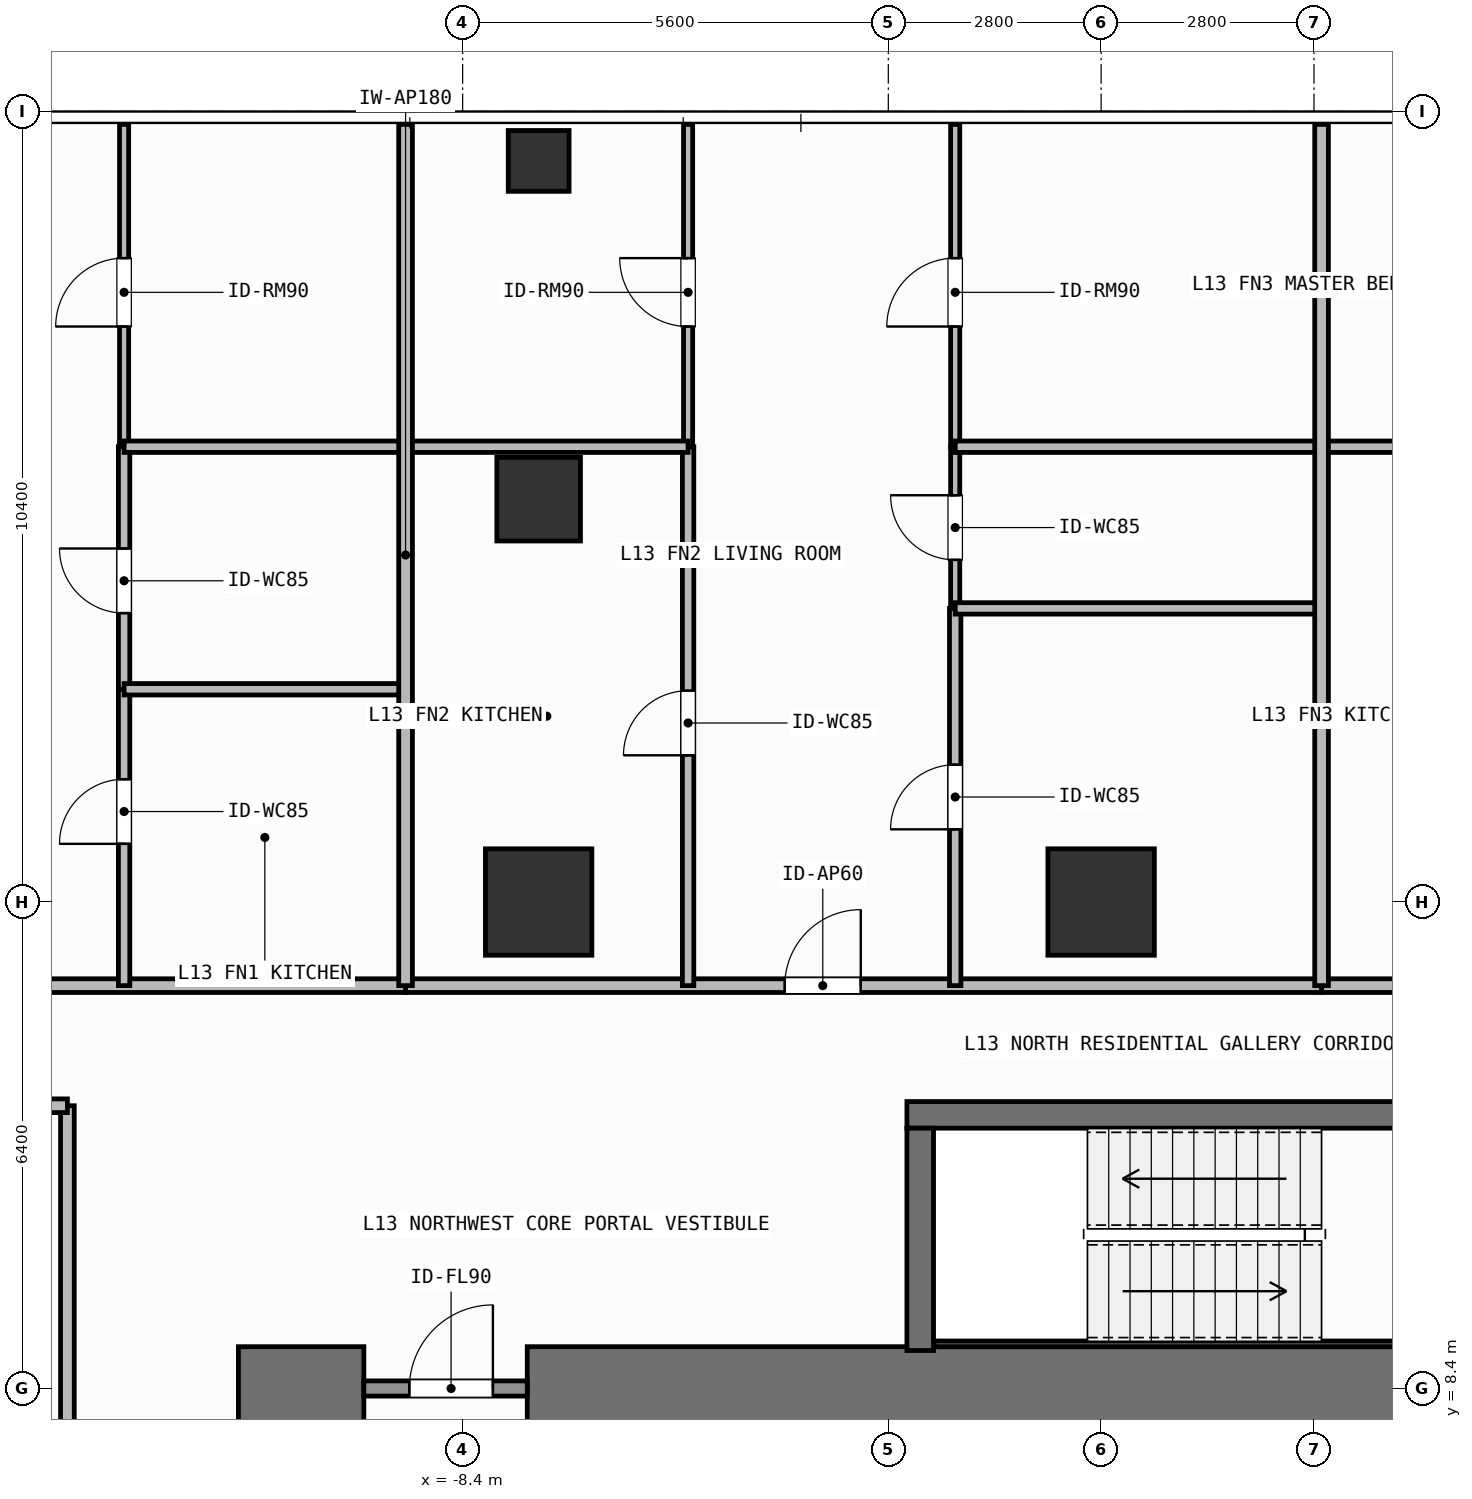
"""IFC4 building model, lengths in metres.
Left out: names, types, materials, properties, quantities, classifications, styles, units other than length and angle.
Written with IfcOpenShell. Run it as: python <this file> out.ifc"""

import sys

from ifc_helpers import new_model, si_unit, direction, frame, frame_2d, origin, origin_2d, place, context, subcontext, project, spatial, rectangle, hollow_rectangle, extrude, element, fill, save


model = new_model("IFC4")
c1 = context("Model", 3, precision=1e-05, world=origin(), true_north=direction((0.0, 1.0)))
c2 = subcontext(c1, "Body", "Model", "MODEL_VIEW")
j1 = project(units=[si_unit("LENGTHUNIT", "METRE"), si_unit("PLANEANGLEUNIT", "RADIAN")], contexts=[c1])
p1 = place(None, origin())
s1 = spatial("IfcSite", under=j1, at=p1, CompositionType="ELEMENT")
p2 = place(p1, origin())
s2 = spatial("IfcBuilding", under=s1, at=p2, CompositionType="ELEMENT")
p3 = place(p2, frame((0.0, 0.0, 50.1)))
s3 = spatial("IfcBuildingStorey", under=s2, at=p3, CompositionType="ELEMENT", Elevation=50.1)
p4 = place(p3, frame((-11.35, 8.4, 0.0), z_axis=(0.0, 0.0, 1.0), x_axis=(1.0, 0.0, 0.0)))
e1 = element("IfcWall", 1, at=p4, inside=s3, PredefinedType="SHEAR", context=c2, shape_type="SweptSolid", body=[
    extrude(rectangle(XDim=1.65, YDim=1.1, at=frame_2d((0.825, 0.0))), origin(), (0.0, 0.0, 1.0), 3.9),
])
p5 = place(p3, frame((-7.55, 8.4, 0.0), z_axis=(0.0, 0.0, 1.0), x_axis=(1.0, 0.0, 0.0)))
e2 = element("IfcWall", 2, at=p5, inside=s3, PredefinedType="SHEAR", context=c2, shape_type="SweptSolid", body=[
    extrude(rectangle(XDim=16.5, YDim=1.1, at=frame_2d((8.25, 0.0))), origin(), (0.0, 0.0, 1.0), 3.9),
])
p6 = place(p3, frame((-2.555, 12.0, 0.0), z_axis=(0.0, 0.0, 1.0), x_axis=(1.0, 0.0, 0.0)))
e3 = element("IfcWall", 3, at=p6, inside=s3, PredefinedType="SHEAR", context=c2, shape_type="SweptSolid", body=[
    extrude(rectangle(XDim=7.31, YDim=0.35, at=frame_2d((3.655, 0.0))), origin(), (0.0, 0.0, 1.0), 3.9),
])
p7 = place(p3, frame((-2.2, 8.988, 0.0), z_axis=(0.0, 0.0, 1.0), x_axis=(1.0, 0.0, 0.0)))
e4 = element("IfcWall", 4, at=p7, inside=s3, PredefinedType="SHEAR", context=c2, shape_type="SweptSolid", body=[
    extrude(rectangle(XDim=6.6, YDim=0.075, at=frame_2d((3.3, 0.0))), origin(), (0.0, 0.0, 1.0), 3.9),
])
p8 = place(p3, frame((-2.38, 8.9, 0.0), z_axis=(0.0, 0.0, 1.0), x_axis=(0.0, 1.0, 0.0)))
e5 = element("IfcWall", 5, at=p8, inside=s3, PredefinedType="SHEAR", context=c2, shape_type="SweptSolid", body=[
    extrude(rectangle(XDim=2.925, YDim=0.35, at=frame_2d((1.462, 0.0))), origin(), (0.0, 0.0, 1.0), 3.9),
])
for number, where, z_axis, x_axis in (
    (6, (-7.4, 14.8, 0.0), (0.0, 0.0, 1.0), (1.0, 0.0, 0.0)),
    (7, (0.0, 14.8, 0.0), (0.0, 0.0, 1.0), (1.0, 0.0, 0.0)),
):
    element("IfcColumn", number, at=place(p3, frame(where, z_axis=z_axis, x_axis=x_axis)), inside=s3, PredefinedType="COLUMN", context=c2, shape_type="SweptSolid", body=[
        extrude(rectangle(XDim=1.4, YDim=1.4, at=origin_2d()), origin(), (0.0, 0.0, 1.0), 3.9),
    ])
p9 = place(p3, frame((-7.4, 20.1, 0.0), z_axis=(0.0, 0.0, 1.0), x_axis=(1.0, 0.0, 0.0)))
e8 = element("IfcColumn", 8, at=p9, inside=s3, PredefinedType="COLUMN", context=c2, shape_type="SweptSolid", body=[
    extrude(rectangle(XDim=1.1, YDim=1.1, at=origin_2d()), origin(), (0.0, 0.0, 1.0), 3.9),
])
p10 = place(p3, frame((-7.4, 24.55, 0.0), z_axis=(0.0, 0.0, 1.0), x_axis=(1.0, 0.0, 0.0)))
e9 = element("IfcColumn", 9, at=p10, inside=s3, PredefinedType="COLUMN", context=c2, shape_type="SweptSolid", body=[
    extrude(hollow_rectangle(XDim=0.8, YDim=0.8, WallThickness=0.036, at=origin_2d()), origin(), (0.0, 0.0, 1.0), 3.9),
])
p11 = place(p3, frame((-9.7, 8.4, 0.0), z_axis=(0.0, 0.0, 1.0), x_axis=(1.0, 0.0, 0.0)))
e10 = element("IfcWall", 10, at=p11, inside=s3, PredefinedType="SOLIDWALL", context=c2, shape_type="SweptSolid", body=[
    extrude(rectangle(XDim=2.15, YDim=0.2, at=frame_2d((1.075, 0.0))), origin(), (0.0, 0.0, 1.0), 2.66),
])
p12 = place(p11, frame((0.598, 0.0, 0.0)))
e11 = element("IfcOpeningElement", 11, at=p12, cuts=e10, PredefinedType="OPENING", context=c2, shape_type="SweptSolid", body=[
    extrude(rectangle(XDim=1.1, YDim=2.15, at=frame_2d((0.55, 1.075))), frame((0.0, 0.11, 0.0), z_axis=(0.0, -1.0, 0.0), x_axis=(1.0, 0.0, 0.0)), (0.0, 0.0, 1.0), 0.22),
])
p13 = place(p3, frame((-18.62, 13.7, 0.0), z_axis=(0.0, 0.0, 1.0), x_axis=(1.0, 0.0, 0.0)))
e12 = element("IfcWall", 12, at=p13, inside=s3, PredefinedType="PARTITIONING", context=c2, shape_type="SweptSolid", body=[
    extrude(rectangle(XDim=9.469, YDim=0.18, at=frame_2d((4.735, 0.0))), origin(), (0.0, 0.0, 1.0), 3.62),
])
p14 = place(p13, frame((1.931, 0.0, 0.0)))
e13 = element("IfcOpeningElement", 13, at=p14, cuts=e12, PredefinedType="OPENING", context=c2, shape_type="SweptSolid", body=[
    extrude(rectangle(XDim=1.0, YDim=2.2, at=frame_2d((0.5, 1.1))), frame((0.0, 0.1, 0.0), z_axis=(0.0, -1.0, 0.0), x_axis=(1.0, 0.0, 0.0)), (0.0, 0.0, 1.0), 0.2),
])
p15 = place(p3, frame((-12.854, 13.7, 0.0), z_axis=(0.0, 0.0, 1.0), x_axis=(0.0, 1.0, 0.0)))
e14 = element("IfcWall", 14, at=p15, inside=s3, PredefinedType="PARTITIONING", context=c2, shape_type="SweptSolid", body=[
    extrude(rectangle(XDim=3.899, YDim=0.15, at=frame_2d((1.95, 0.0))), origin(), (0.0, 0.0, 1.0), 3.62),
])
p16 = place(p15, frame((1.865, 0.0, 0.0)))
e15 = element("IfcOpeningElement", 15, at=p16, cuts=e14, PredefinedType="OPENING", context=c2, shape_type="SweptSolid", body=[
    extrude(rectangle(XDim=0.85, YDim=2.1, at=frame_2d((0.425, 1.05))), frame((0.0, 0.085, 0.0), z_axis=(0.0, -1.0, 0.0), x_axis=(1.0, 0.0, 0.0)), (0.0, 0.0, 1.0), 0.17),
])
p17 = place(p3, frame((-12.854, 17.599, 0.0), z_axis=(0.0, 0.0, 1.0), x_axis=(0.0, 1.0, 0.0)))
e16 = element("IfcWall", 16, at=p17, inside=s3, PredefinedType="PARTITIONING", context=c2, shape_type="SweptSolid", body=[
    extrude(rectangle(XDim=3.191, YDim=0.15, at=frame_2d((1.595, 0.0))), origin(), (0.0, 0.0, 1.0), 3.62),
])
p18 = place(p17, frame((1.002, 0.0, 0.0)))
e17 = element("IfcOpeningElement", 17, at=p18, cuts=e16, PredefinedType="OPENING", context=c2, shape_type="SweptSolid", body=[
    extrude(rectangle(XDim=0.85, YDim=2.1, at=frame_2d((0.425, 1.05))), frame((0.0, 0.085, 0.0), z_axis=(0.0, -1.0, 0.0), x_axis=(1.0, 0.0, 0.0)), (0.0, 0.0, 1.0), 0.17),
])
p19 = place(p3, frame((-12.854, 20.79, 0.0), z_axis=(0.0, 0.0, 1.0), x_axis=(0.0, 1.0, 0.0)))
e18 = element("IfcWall", 18, at=p19, inside=s3, PredefinedType="PARTITIONING", context=c2, shape_type="SweptSolid", body=[
    extrude(rectangle(XDim=4.24, YDim=0.12, at=frame_2d((2.12, 0.0))), origin(), (0.0, 0.0, 1.0), 3.62),
])
p20 = place(p19, frame((1.581, 0.0, 0.0)))
e19 = element("IfcOpeningElement", 19, at=p20, cuts=e18, PredefinedType="OPENING", context=c2, shape_type="SweptSolid", body=[
    extrude(rectangle(XDim=0.9, YDim=2.1, at=frame_2d((0.45, 1.05))), frame((0.0, 0.07, 0.0), z_axis=(0.0, -1.0, 0.0), x_axis=(1.0, 0.0, 0.0)), (0.0, 0.0, 1.0), 0.14),
])
p21 = place(p3, frame((-9.151, 13.7, 0.0), z_axis=(0.0, 0.0, 1.0), x_axis=(1.0, 0.0, 0.0)))
e20 = element("IfcWall", 20, at=p21, inside=s3, PredefinedType="PARTITIONING", context=c2, shape_type="SweptSolid", body=[
    extrude(rectangle(XDim=12.051, YDim=0.18, at=frame_2d((6.025, 0.0))), origin(), (0.0, 0.0, 1.0), 3.62),
])
p22 = place(p21, frame((4.989, 0.0, 0.0)))
e21 = element("IfcOpeningElement", 21, at=p22, cuts=e20, PredefinedType="OPENING", context=c2, shape_type="SweptSolid", body=[
    extrude(rectangle(XDim=1.0, YDim=2.2, at=frame_2d((0.5, 1.1))), frame((0.0, 0.1, 0.0), z_axis=(0.0, -1.0, 0.0), x_axis=(1.0, 0.0, 0.0)), (0.0, 0.0, 1.0), 0.2),
])
p23 = place(p3, frame((-5.434, 13.7, 0.0), z_axis=(0.0, 0.0, 1.0), x_axis=(0.0, 1.0, 0.0)))
e22 = element("IfcWall", 22, at=p23, inside=s3, PredefinedType="PARTITIONING", context=c2, shape_type="SweptSolid", body=[
    extrude(rectangle(XDim=7.09, YDim=0.15, at=frame_2d((3.545, 0.0))), origin(), (0.0, 0.0, 1.0), 3.62),
])
p24 = place(p23, frame((3.03, 0.0, 0.0)))
e23 = element("IfcOpeningElement", 23, at=p24, cuts=e22, PredefinedType="OPENING", context=c2, shape_type="SweptSolid", body=[
    extrude(rectangle(XDim=0.85, YDim=2.1, at=frame_2d((0.425, 1.05))), frame((0.0, 0.085, 0.0), z_axis=(0.0, -1.0, 0.0), x_axis=(1.0, 0.0, 0.0)), (0.0, 0.0, 1.0), 0.17),
])
p25 = place(p3, frame((-5.434, 20.79, 0.0), z_axis=(0.0, 0.0, 1.0), x_axis=(0.0, 1.0, 0.0)))
e24 = element("IfcWall", 24, at=p25, inside=s3, PredefinedType="PARTITIONING", context=c2, shape_type="SweptSolid", body=[
    extrude(rectangle(XDim=4.24, YDim=0.12, at=frame_2d((2.12, 0.0))), origin(), (0.0, 0.0, 1.0), 3.62),
])
p26 = place(p25, frame((1.581, 0.0, 0.0)))
e25 = element("IfcOpeningElement", 25, at=p26, cuts=e24, PredefinedType="OPENING", context=c2, shape_type="SweptSolid", body=[
    extrude(rectangle(XDim=0.9, YDim=2.1, at=frame_2d((0.45, 1.05))), frame((0.0, 0.07, 0.0), z_axis=(0.0, -1.0, 0.0), x_axis=(1.0, 0.0, 0.0)), (0.0, 0.0, 1.0), 0.14),
])
p27 = place(p3, frame((-1.92, 13.7, 0.0), z_axis=(0.0, 0.0, 1.0), x_axis=(0.0, 1.0, 0.0)))
e26 = element("IfcWall", 26, at=p27, inside=s3, PredefinedType="PARTITIONING", context=c2, shape_type="SweptSolid", body=[
    extrude(rectangle(XDim=4.963, YDim=0.15, at=frame_2d((2.481, 0.0))), origin(), (0.0, 0.0, 1.0), 3.62),
])
p28 = place(p27, frame((2.056, 0.0, 0.0)))
e27 = element("IfcOpeningElement", 27, at=p28, cuts=e26, PredefinedType="OPENING", context=c2, shape_type="SweptSolid", body=[
    extrude(rectangle(XDim=0.85, YDim=2.1, at=frame_2d((0.425, 1.05))), frame((0.0, 0.085, 0.0), z_axis=(0.0, -1.0, 0.0), x_axis=(1.0, 0.0, 0.0)), (0.0, 0.0, 1.0), 0.17),
])
p29 = place(p3, frame((-1.92, 18.663, 0.0), z_axis=(0.0, 0.0, 1.0), x_axis=(0.0, 1.0, 0.0)))
e28 = element("IfcWall", 28, at=p29, inside=s3, PredefinedType="PARTITIONING", context=c2, shape_type="SweptSolid", body=[
    extrude(rectangle(XDim=2.127, YDim=0.12, at=frame_2d((1.063, 0.0))), origin(), (0.0, 0.0, 1.0), 3.62),
])
p30 = place(p29, frame((0.638, 0.0, 0.0)))
e29 = element("IfcOpeningElement", 29, at=p30, cuts=e28, PredefinedType="OPENING", context=c2, shape_type="SweptSolid", body=[
    extrude(rectangle(XDim=0.85, YDim=2.1, at=frame_2d((0.425, 1.05))), frame((0.0, 0.07, 0.0), z_axis=(0.0, -1.0, 0.0), x_axis=(1.0, 0.0, 0.0)), (0.0, 0.0, 1.0), 0.14),
])
p31 = place(p3, frame((-1.92, 20.79, 0.0), z_axis=(0.0, 0.0, 1.0), x_axis=(0.0, 1.0, 0.0)))
e30 = element("IfcWall", 30, at=p31, inside=s3, PredefinedType="PARTITIONING", context=c2, shape_type="SweptSolid", body=[
    extrude(rectangle(XDim=4.24, YDim=0.12, at=frame_2d((2.12, 0.0))), origin(), (0.0, 0.0, 1.0), 3.62),
])
p32 = place(p31, frame((1.581, 0.0, 0.0)))
e31 = element("IfcOpeningElement", 31, at=p32, cuts=e30, PredefinedType="OPENING", context=c2, shape_type="SweptSolid", body=[
    extrude(rectangle(XDim=0.9, YDim=2.1, at=frame_2d((0.45, 1.05))), frame((0.0, 0.07, 0.0), z_axis=(0.0, -1.0, 0.0), x_axis=(1.0, 0.0, 0.0)), (0.0, 0.0, 1.0), 0.14),
])
p33 = place(p3, frame((2.9, 13.7, 0.0), z_axis=(0.0, 0.0, 1.0), x_axis=(1.0, 0.0, 0.0)))
e32 = element("IfcWall", 32, at=p33, inside=s3, PredefinedType="PARTITIONING", context=c2, shape_type="SweptSolid", body=[
    extrude(rectangle(XDim=12.051, YDim=0.18, at=frame_2d((6.025, 0.0))), origin(), (0.0, 0.0, 1.0), 3.62),
])
p34 = place(p33, frame((5.347, 0.0, 0.0)))
e33 = element("IfcOpeningElement", 33, at=p34, cuts=e32, PredefinedType="OPENING", context=c2, shape_type="SweptSolid", body=[
    extrude(rectangle(XDim=1.0, YDim=2.2, at=frame_2d((0.5, 1.1))), frame((0.0, 0.1, 0.0), z_axis=(0.0, -1.0, 0.0), x_axis=(1.0, 0.0, 0.0)), (0.0, 0.0, 1.0), 0.2),
])
p35 = place(p3, frame((-13.6, -12.12, 0.0), z_axis=(0.0, 0.0, 1.0), x_axis=(0.0, 1.0, 0.0)))
e34 = element("IfcWall", 34, at=p35, inside=s3, PredefinedType="PARTITIONING", context=c2, shape_type="SweptSolid", body=[
    extrude(rectangle(XDim=24.24, YDim=0.18, at=frame_2d((12.12, 0.0))), origin(), (0.0, 0.0, 1.0), 3.62),
])
p36 = place(p35, frame((9.829, 0.0, 0.0)))
e35 = element("IfcOpeningElement", 35, at=p36, cuts=e34, PredefinedType="OPENING", context=c2, shape_type="SweptSolid", body=[
    extrude(rectangle(XDim=1.0, YDim=2.2, at=frame_2d((0.5, 1.1))), frame((0.0, 0.1, 0.0), z_axis=(0.0, -1.0, 0.0), x_axis=(1.0, 0.0, 0.0)), (0.0, 0.0, 1.0), 0.2),
])
for number, where, z_axis, x_axis in (
    (36, (-12.854, 17.599, 0.0), (0.0, 0.0, 1.0), (1.0, 0.0, 0.0)),
    (37, (-12.854, 20.79, 0.0), (0.0, 0.0, 1.0), (1.0, 0.0, 0.0)),
):
    element("IfcWall", number, at=place(p3, frame(where, z_axis=z_axis, x_axis=x_axis)), inside=s3, PredefinedType="PARTITIONING", context=c2, shape_type="SweptSolid", body=[
        extrude(rectangle(XDim=3.703, YDim=0.15, at=frame_2d((1.852, 0.0))), origin(), (0.0, 0.0, 1.0), 3.62),
    ])
p37 = place(p3, frame((-9.151, 20.79, 0.0), z_axis=(0.0, 0.0, 1.0), x_axis=(1.0, 0.0, 0.0)))
e38 = element("IfcWall", 38, at=p37, inside=s3, PredefinedType="PARTITIONING", context=c2, shape_type="SweptSolid", body=[
    extrude(rectangle(XDim=3.717, YDim=0.15, at=frame_2d((1.858, 0.0))), origin(), (0.0, 0.0, 1.0), 3.62),
])
for number, where, z_axis, x_axis in (
    (39, (-1.92, 18.663, 0.0), (0.0, 0.0, 1.0), (1.0, 0.0, 0.0)),
    (40, (-1.92, 20.79, 0.0), (0.0, 0.0, 1.0), (1.0, 0.0, 0.0)),
):
    element("IfcWall", number, at=place(p3, frame(where, z_axis=z_axis, x_axis=x_axis)), inside=s3, PredefinedType="PARTITIONING", context=c2, shape_type="SweptSolid", body=[
        extrude(rectangle(XDim=4.82, YDim=0.15, at=frame_2d((2.41, 0.0))), origin(), (0.0, 0.0, 1.0), 3.62),
    ])
p38 = place(p3, frame((-9.151, 13.7, 0.0), z_axis=(0.0, 0.0, 1.0), x_axis=(0.0, 1.0, 0.0)))
e41 = element("IfcWall", 41, at=p38, inside=s3, PredefinedType="PARTITIONING", context=c2, shape_type="SweptSolid", body=[
    extrude(rectangle(XDim=11.33, YDim=0.18, at=frame_2d((5.665, 0.0))), origin(), (0.0, 0.0, 1.0), 3.62),
])
p39 = place(p3, frame((2.9, 20.79, 0.0), z_axis=(0.0, 0.0, 1.0), x_axis=(1.0, 0.0, 0.0)))
e42 = element("IfcWall", 42, at=p39, inside=s3, PredefinedType="PARTITIONING", context=c2, shape_type="SweptSolid", body=[
    extrude(rectangle(XDim=2.85, YDim=0.15, at=frame_2d((1.425, 0.0))), origin(), (0.0, 0.0, 1.0), 3.62),
])
p40 = place(p3, frame((2.9, 13.7, 0.0), z_axis=(0.0, 0.0, 1.0), x_axis=(0.0, 1.0, 0.0)))
e43 = element("IfcWall", 43, at=p40, inside=s3, PredefinedType="PARTITIONING", context=c2, shape_type="SweptSolid", body=[
    extrude(rectangle(XDim=11.33, YDim=0.18, at=frame_2d((5.665, 0.0))), origin(), (0.0, 0.0, 1.0), 3.62),
])
p41 = place(p3, frame((-22.13, 12.12, 0.0), z_axis=(0.0, 0.0, 1.0), x_axis=(1.0, 0.0, 0.0)))
e44 = element("IfcWall", 44, at=p41, inside=s3, PredefinedType="PARTITIONING", context=c2, shape_type="SweptSolid", body=[
    extrude(rectangle(XDim=8.53, YDim=0.18, at=frame_2d((4.265, 0.0))), origin(), (0.0, 0.0, 1.0), 3.62),
])
p42 = place(p12, origin())
e45 = element("IfcDoor", 45, at=p42, inside=s3, OperationType="SINGLE_SWING_RIGHT", PredefinedType="DOOR", context=c2, shape_type="SweptSolid", body=[
    extrude(rectangle(XDim=1.1, YDim=2.15, at=frame_2d((0.55, 1.075))), frame((0.0, 0.025, 0.0), z_axis=(0.0, -1.0, 0.0), x_axis=(1.0, 0.0, 0.0)), (0.0, 0.0, 1.0), 0.05),
])
fill(e11, e45)
p43 = place(p16, origin())
e46 = element("IfcDoor", 46, at=p43, inside=s3, OperationType="SINGLE_SWING_LEFT", PredefinedType="DOOR", context=c2, shape_type="SweptSolid", body=[
    extrude(rectangle(XDim=0.85, YDim=2.1, at=frame_2d((0.425, 1.05))), frame((0.0, 0.025, 0.0), z_axis=(0.0, -1.0, 0.0), x_axis=(1.0, 0.0, 0.0)), (0.0, 0.0, 1.0), 0.05),
])
fill(e15, e46)
p44 = place(p18, origin())
e47 = element("IfcDoor", 47, at=p44, inside=s3, OperationType="SINGLE_SWING_RIGHT", PredefinedType="DOOR", context=c2, shape_type="SweptSolid", body=[
    extrude(rectangle(XDim=0.85, YDim=2.1, at=frame_2d((0.425, 1.05))), frame((0.0, 0.025, 0.0), z_axis=(0.0, -1.0, 0.0), x_axis=(1.0, 0.0, 0.0)), (0.0, 0.0, 1.0), 0.05),
])
fill(e17, e47)
p45 = place(p20, origin())
e48 = element("IfcDoor", 48, at=p45, inside=s3, OperationType="SINGLE_SWING_LEFT", PredefinedType="DOOR", context=c2, shape_type="SweptSolid", body=[
    extrude(rectangle(XDim=0.9, YDim=2.1, at=frame_2d((0.45, 1.05))), frame((0.0, 0.025, 0.0), z_axis=(0.0, -1.0, 0.0), x_axis=(1.0, 0.0, 0.0)), (0.0, 0.0, 1.0), 0.05),
])
fill(e19, e48)
p46 = place(p22, origin())
e49 = element("IfcDoor", 49, at=p46, inside=s3, OperationType="SINGLE_SWING_RIGHT", PredefinedType="DOOR", context=c2, shape_type="SweptSolid", body=[
    extrude(rectangle(XDim=1.0, YDim=2.2, at=frame_2d((0.5, 1.1))), frame((0.0, 0.025, 0.0), z_axis=(0.0, -1.0, 0.0), x_axis=(1.0, 0.0, 0.0)), (0.0, 0.0, 1.0), 0.05),
])
fill(e21, e49)
p47 = place(p24, origin())
e50 = element("IfcDoor", 50, at=p47, inside=s3, OperationType="SINGLE_SWING_LEFT", PredefinedType="DOOR", context=c2, shape_type="SweptSolid", body=[
    extrude(rectangle(XDim=0.85, YDim=2.1, at=frame_2d((0.425, 1.05))), frame((0.0, 0.025, 0.0), z_axis=(0.0, -1.0, 0.0), x_axis=(1.0, 0.0, 0.0)), (0.0, 0.0, 1.0), 0.05),
])
fill(e23, e50)
p48 = place(p26, origin())
e51 = element("IfcDoor", 51, at=p48, inside=s3, OperationType="SINGLE_SWING_RIGHT", PredefinedType="DOOR", context=c2, shape_type="SweptSolid", body=[
    extrude(rectangle(XDim=0.9, YDim=2.1, at=frame_2d((0.45, 1.05))), frame((0.0, 0.025, 0.0), z_axis=(0.0, -1.0, 0.0), x_axis=(1.0, 0.0, 0.0)), (0.0, 0.0, 1.0), 0.05),
])
fill(e25, e51)
p49 = place(p28, origin())
e52 = element("IfcDoor", 52, at=p49, inside=s3, OperationType="SINGLE_SWING_LEFT", PredefinedType="DOOR", context=c2, shape_type="SweptSolid", body=[
    extrude(rectangle(XDim=0.85, YDim=2.1, at=frame_2d((0.425, 1.05))), frame((0.0, 0.025, 0.0), z_axis=(0.0, -1.0, 0.0), x_axis=(1.0, 0.0, 0.0)), (0.0, 0.0, 1.0), 0.05),
])
fill(e27, e52)
p50 = place(p30, origin())
e53 = element("IfcDoor", 53, at=p50, inside=s3, OperationType="SINGLE_SWING_RIGHT", PredefinedType="DOOR", context=c2, shape_type="SweptSolid", body=[
    extrude(rectangle(XDim=0.85, YDim=2.1, at=frame_2d((0.425, 1.05))), frame((0.0, 0.025, 0.0), z_axis=(0.0, -1.0, 0.0), x_axis=(1.0, 0.0, 0.0)), (0.0, 0.0, 1.0), 0.05),
])
fill(e29, e53)
p51 = place(p32, origin())
e54 = element("IfcDoor", 54, at=p51, inside=s3, OperationType="SINGLE_SWING_LEFT", PredefinedType="DOOR", context=c2, shape_type="SweptSolid", body=[
    extrude(rectangle(XDim=0.9, YDim=2.1, at=frame_2d((0.45, 1.05))), frame((0.0, 0.025, 0.0), z_axis=(0.0, -1.0, 0.0), x_axis=(1.0, 0.0, 0.0)), (0.0, 0.0, 1.0), 0.05),
])
fill(e31, e54)
save(model, sys.argv[1])
